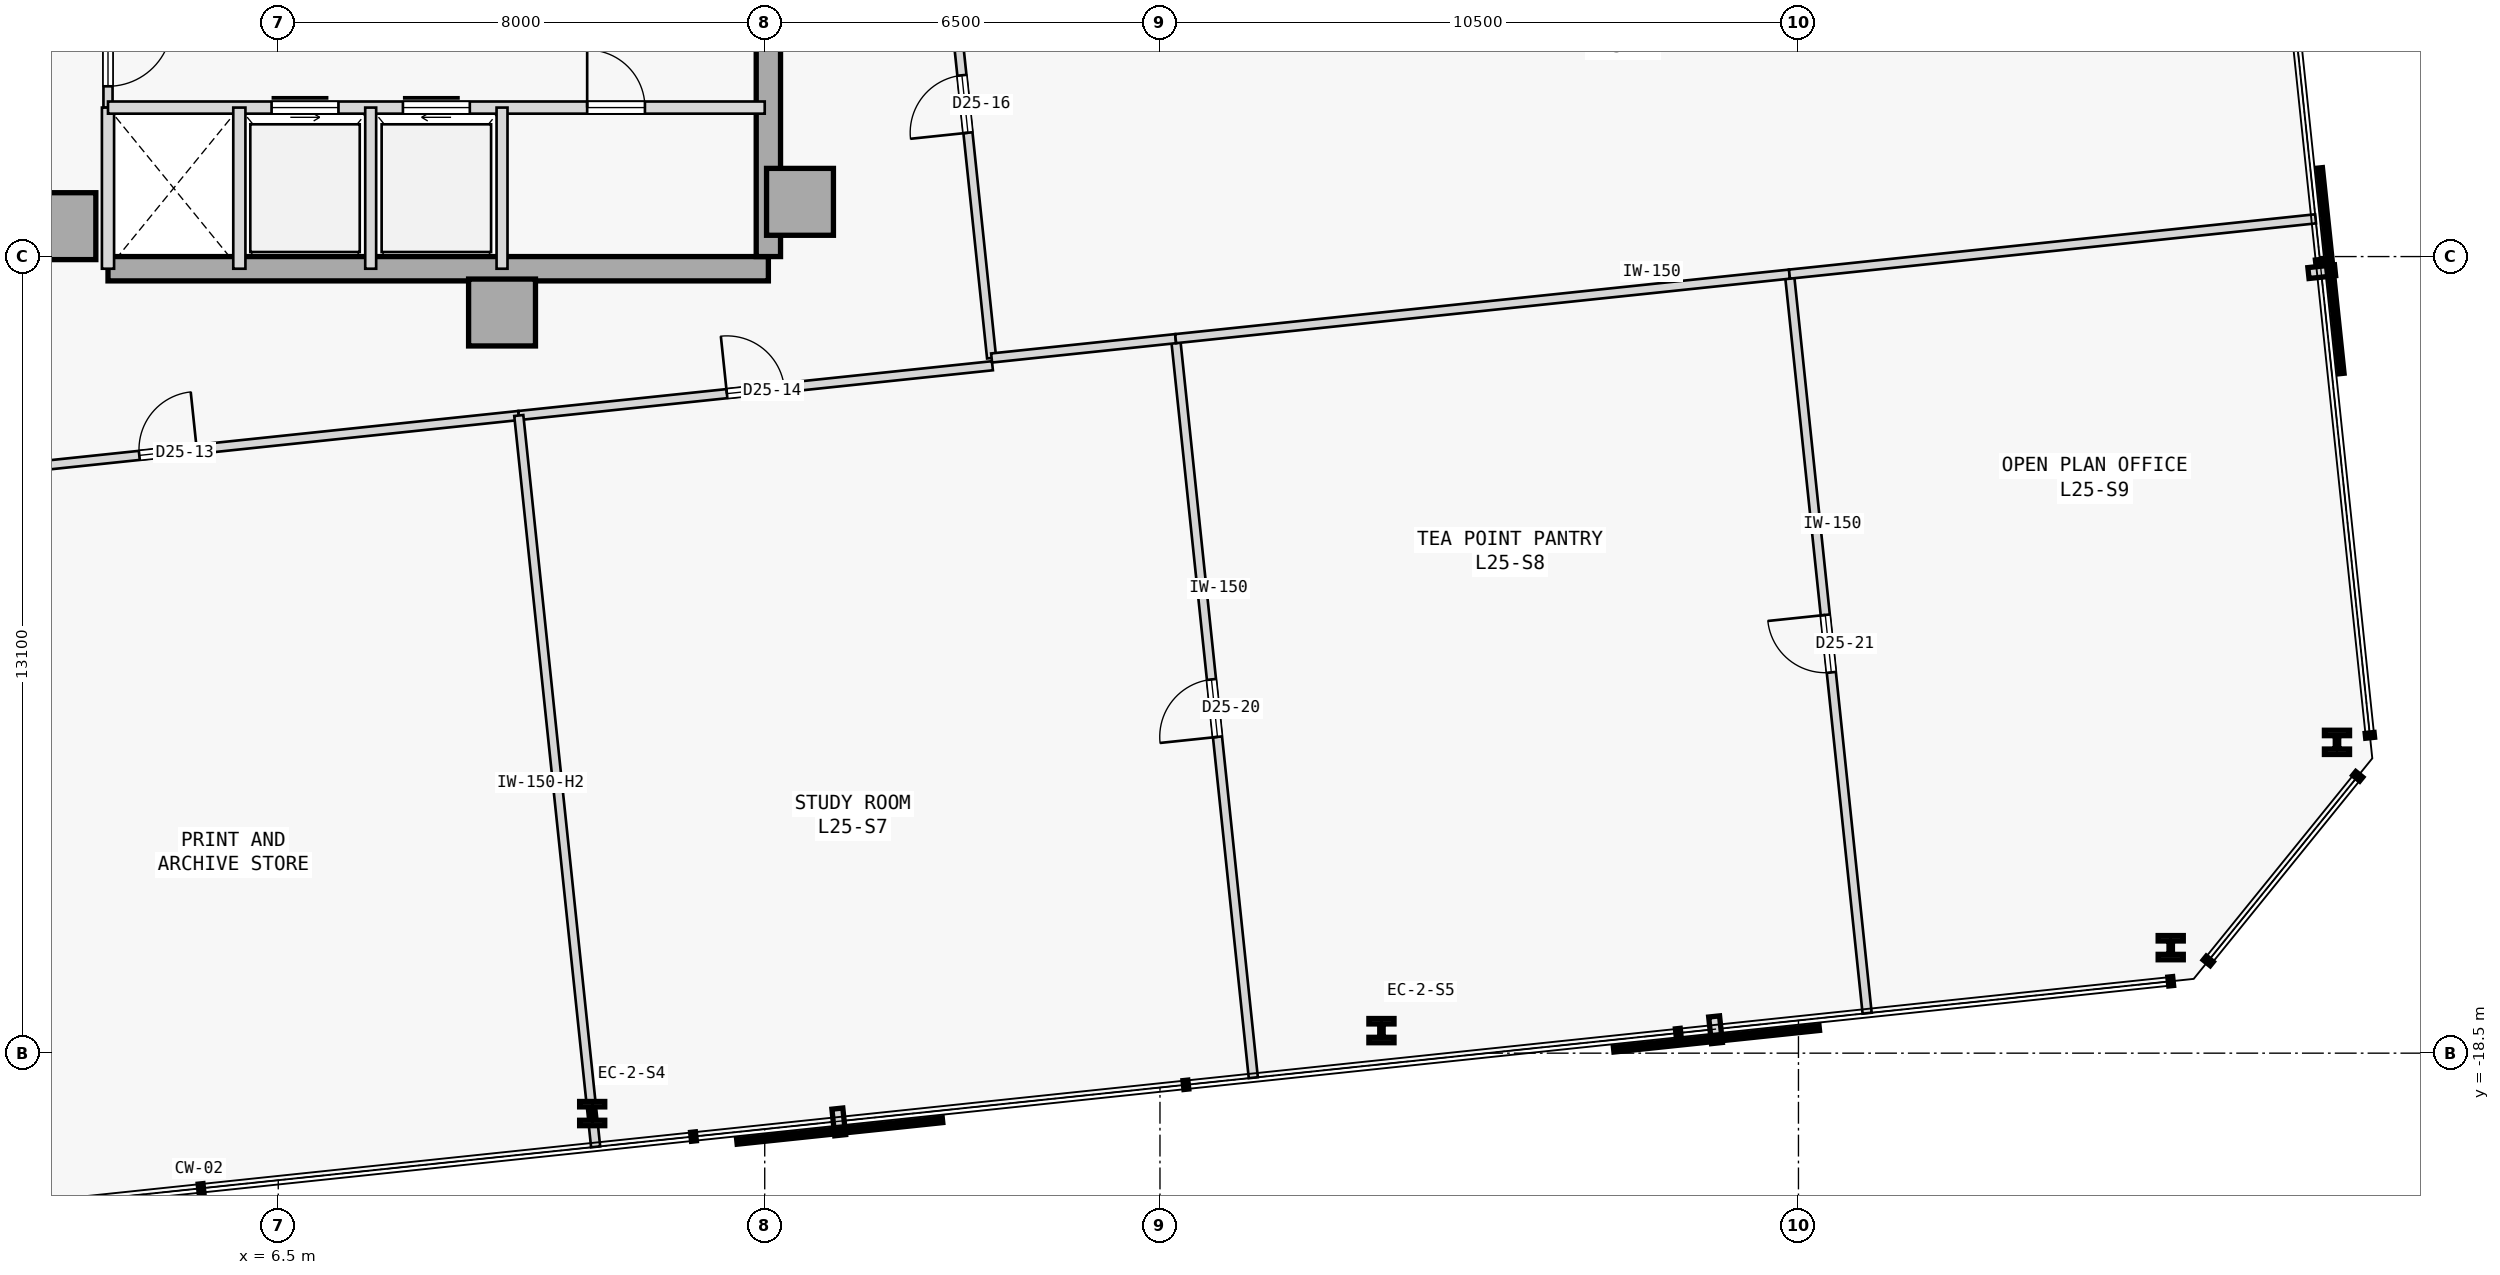
"""IFC4 building model, lengths in metres.
Left out: names, types, materials, properties, quantities, classifications, styles, units other than length and angle.
Written with IfcOpenShell. Run it as: python <this file> out.ifc"""

import sys

from ifc_helpers import new_model, si_unit, direction, frame, frame_2d, origin, origin_2d, place, context, subcontext, project, spatial, rectangle, i_section, extrude, element, fill, save


model = new_model("IFC4")
c1 = context("Model", 3, precision=1e-05, world=origin(), true_north=direction((0.0, 1.0)))
c2 = subcontext(c1, "Body", "Model", "MODEL_VIEW")
j1 = project(units=[si_unit("LENGTHUNIT", "METRE"), si_unit("PLANEANGLEUNIT", "RADIAN")], contexts=[c1])
p1 = place(None, origin())
s1 = spatial("IfcSite", under=j1, at=p1, CompositionType="ELEMENT")
p2 = place(p1, origin())
s2 = spatial("IfcBuilding", under=s1, at=p2, CompositionType="ELEMENT")
p3 = place(p2, frame((0.0, 0.0, 102.2)))
s3 = spatial("IfcBuildingStorey", under=s2, at=p3, CompositionType="ELEMENT", Elevation=102.2)
for number, where, z_axis, x_axis in (
    (1, (15.08, -4.5, 0.0), (0.0, 0.0, 1.0), (1.0, 0.0, 0.0)),
    (2, (10.18, -6.32, 0.0), (0.0, 0.0, 1.0), (1.0, 0.0, 0.0)),
    (3, (2.95, -4.9, 0.0), (0.0, 0.0, 1.0), (1.0, 0.0, 0.0)),
):
    element("IfcColumn", number, at=place(p3, frame(where, z_axis=z_axis, x_axis=x_axis)), inside=s3, PredefinedType="COLUMN", context=c2, shape_type="SweptSolid", body=[
        extrude(rectangle(XDim=1.1, YDim=1.1, at=origin_2d()), origin(), (0.0, 0.0, 1.0), 3.7),
    ])
p4 = place(p3, frame((3.7, -5.6, 0.0), z_axis=(0.0, 0.0, 1.0), x_axis=(1.0, 0.0, 0.0)))
e4 = element("IfcWall", 4, at=p4, inside=s3, PredefinedType="SHEAR", context=c2, shape_type="SweptSolid", body=[
    extrude(rectangle(XDim=10.86, YDim=0.4, at=frame_2d((5.43, 0.0))), origin(), (0.0, 0.0, 1.0), 3.475),
])
p5 = place(p3, frame((14.56, -5.4, 0.0), z_axis=(0.0, 0.0, 1.0), x_axis=(0.0, 1.0, 0.0)))
e5 = element("IfcWall", 5, at=p5, inside=s3, PredefinedType="SHEAR", context=c2, shape_type="SweptSolid", body=[
    extrude(rectangle(XDim=10.8, YDim=0.4, at=frame_2d((5.4, 0.0))), origin(), (0.0, 0.0, 1.0), 3.475),
])
for number, where, z_axis, x_axis in (
    (6, (11.663, -19.494, 0.0), (0.0, 0.0, 1.0), (1.0, 0.0, 0.0)),
    (7, (24.642, -18.129, 0.0), (0.0, 0.0, 1.0), (1.0, 0.0, 0.0)),
    (8, (37.622, -16.765, 0.0), (0.0, 0.0, 1.0), (1.0, 0.0, 0.0)),
    (9, (40.356, -13.389, 0.0), (0.0, 0.0, 1.0), (1.0, 0.0, 0.0)),
):
    element("IfcColumn", number, at=place(p3, frame(where, z_axis=z_axis, x_axis=x_axis)), inside=s3, PredefinedType="COLUMN", context=c2, shape_type="SweptSolid", body=[
        extrude(i_section(OverallWidth=0.413, OverallDepth=0.398, WebThickness=0.056, FlangeThickness=0.089, FilletRadius=0.015, at=origin_2d()), origin(), (0.0, 0.0, 1.0), 3.7),
    ])
p6 = place(p3, frame((3.7, -2.95, 0.0), z_axis=(0.0, 0.0, 1.0), x_axis=(0.0, 1.0, 0.0)))
e10 = element("IfcWall", 10, at=p6, inside=s3, PredefinedType="PARTITIONING", context=c2, shape_type="SweptSolid", body=[
    extrude(rectangle(XDim=1.8, YDim=0.15, at=frame_2d((0.9, 0.0))), origin(), (0.0, 0.0, 1.0), 3.475),
])
p7 = place(p6, frame((0.35, 0.0, 0.0)))
e11 = element("IfcOpeningElement", 11, at=p7, cuts=e10, PredefinedType="OPENING", context=c2, shape_type="SweptSolid", body=[
    extrude(rectangle(XDim=1.05, YDim=2.18, at=frame_2d((0.525, 1.09))), frame((0.0, 0.085, 0.0), z_axis=(0.0, -1.0, 0.0), x_axis=(1.0, 0.0, 0.0)), (0.0, 0.0, 1.0), 0.17),
])
p8 = place(p3, frame((3.7, -5.6, 0.0), z_axis=(0.0, 0.0, 1.0), x_axis=(0.0, 1.0, 0.0)))
e12 = element("IfcWall", 12, at=p8, inside=s3, PredefinedType="STANDARD", context=c2, shape_type="SweptSolid", body=[
    extrude(rectangle(XDim=2.65, YDim=0.2, at=frame_2d((1.325, 0.0))), origin(), (0.0, 0.0, 1.0), 3.475),
])
p9 = place(p3, frame((3.7, -2.95, 0.0), z_axis=(0.0, 0.0, 1.0), x_axis=(1.0, 0.0, 0.0)))
e13 = element("IfcWall", 13, at=p9, inside=s3, PredefinedType="STANDARD", context=c2, shape_type="SweptSolid", body=[
    extrude(rectangle(XDim=10.8, YDim=0.2, at=frame_2d((5.4, 0.0))), origin(), (0.0, 0.0, 1.0), 3.475),
])
p10 = place(p9, frame((2.69, 0.0, 0.0)))
e14 = element("IfcOpeningElement", 14, at=p10, cuts=e13, PredefinedType="OPENING", context=c2, shape_type="SweptSolid", body=[
    extrude(rectangle(XDim=1.1, YDim=2.15, at=frame_2d((0.55, 1.075))), frame((0.0, 0.11, 0.0), z_axis=(0.0, -1.0, 0.0), x_axis=(1.0, 0.0, 0.0)), (0.0, 0.0, 1.0), 0.22),
])
p11 = place(p9, frame((4.85, 0.0, 0.0)))
e15 = element("IfcOpeningElement", 15, at=p11, cuts=e13, PredefinedType="OPENING", context=c2, shape_type="SweptSolid", body=[
    extrude(rectangle(XDim=1.1, YDim=2.15, at=frame_2d((0.55, 1.075))), frame((0.0, 0.11, 0.0), z_axis=(0.0, -1.0, 0.0), x_axis=(1.0, 0.0, 0.0)), (0.0, 0.0, 1.0), 0.22),
])
p12 = place(p9, frame((7.88, 0.0, 0.0)))
e16 = element("IfcOpeningElement", 16, at=p12, cuts=e13, PredefinedType="OPENING", context=c2, shape_type="SweptSolid", body=[
    extrude(rectangle(XDim=0.95, YDim=2.15, at=frame_2d((0.475, 1.075))), frame((0.0, 0.11, 0.0), z_axis=(0.0, -1.0, 0.0), x_axis=(1.0, 0.0, 0.0)), (0.0, 0.0, 1.0), 0.22),
])
p13 = place(p3, frame((5.86, -5.6, 0.0), z_axis=(0.0, 0.0, 1.0), x_axis=(0.0, 1.0, 0.0)))
e17 = element("IfcWall", 17, at=p13, inside=s3, PredefinedType="STANDARD", context=c2, shape_type="SweptSolid", body=[
    extrude(rectangle(XDim=2.65, YDim=0.2, at=frame_2d((1.325, 0.0))), origin(), (0.0, 0.0, 1.0), 3.475),
])
for number, where, z_axis, x_axis in (
    (18, (10.18, -5.6, 0.0), (0.0, 0.0, 1.0), (0.0, 1.0, 0.0)),
    (19, (8.02, -5.6, 0.0), (0.0, 0.0, 1.0), (0.0, 1.0, 0.0)),
):
    element("IfcWall", number, at=place(p3, frame(where, z_axis=z_axis, x_axis=x_axis)), inside=s3, PredefinedType="STANDARD", context=c2, shape_type="SweptSolid", body=[
        extrude(rectangle(XDim=2.65, YDim=0.18, at=frame_2d((1.325, 0.0))), origin(), (0.0, 0.0, 1.0), 3.475),
    ])
p14 = place(p3, frame((-1.081, -9.226, 0.0), z_axis=(0.0, 0.0, 1.0), x_axis=(0.994523198252, 0.104516066418, 0.0)))
e20 = element("IfcWall", 20, at=p14, inside=s3, PredefinedType="PARTITIONING", context=c2, shape_type="SweptSolid", body=[
    extrude(rectangle(XDim=11.6, YDim=0.15, at=frame_2d((5.8, 0.0))), origin(), (0.0, 0.0, 1.0), 3.475),
])
p15 = place(p14, frame((5.325, 0.0, 0.0)))
e21 = element("IfcOpeningElement", 21, at=p15, cuts=e20, PredefinedType="OPENING", context=c2, shape_type="SweptSolid", body=[
    extrude(rectangle(XDim=0.95, YDim=2.15, at=frame_2d((0.475, 1.075))), frame((0.0, 0.085, 0.0), z_axis=(0.0, -1.0, 0.0), x_axis=(1.0, 0.0, 0.0)), (0.0, 0.0, 1.0), 0.17),
])
p16 = place(p3, frame((10.456, -8.014, 0.0), z_axis=(0.0, 0.0, 1.0), x_axis=(0.994522690965, 0.104520893393, 0.0)))
e22 = element("IfcWall", 22, at=p16, inside=s3, PredefinedType="PARTITIONING", context=c2, shape_type="SweptSolid", body=[
    extrude(rectangle(XDim=7.832, YDim=0.15, at=frame_2d((3.916, 0.0))), origin(), (0.0, 0.0, 1.0), 3.475),
])
p17 = place(p16, frame((3.441, 0.0, 0.0)))
e23 = element("IfcOpeningElement", 23, at=p17, cuts=e22, PredefinedType="OPENING", context=c2, shape_type="SweptSolid", body=[
    extrude(rectangle(XDim=0.95, YDim=2.15, at=frame_2d((0.475, 1.075))), frame((0.0, 0.085, 0.0), z_axis=(0.0, -1.0, 0.0), x_axis=(1.0, 0.0, 0.0)), (0.0, 0.0, 1.0), 0.17),
])
p18 = place(p3, frame((18.231, -7.068, 0.0), z_axis=(0.0, 0.0, 1.0), x_axis=(-0.104527419485, 0.994522005074, 0.0)))
e24 = element("IfcWall", 24, at=p18, inside=s3, PredefinedType="PARTITIONING", context=c2, shape_type="SweptSolid", body=[
    extrude(rectangle(XDim=8.399, YDim=0.15, at=frame_2d((4.199, 0.0))), origin(), (0.0, 0.0, 1.0), 3.475),
])
p19 = place(p18, frame((3.725, 0.0, 0.0)))
e25 = element("IfcOpeningElement", 25, at=p19, cuts=e24, PredefinedType="OPENING", context=c2, shape_type="SweptSolid", body=[
    extrude(rectangle(XDim=0.95, YDim=2.15, at=frame_2d((0.475, 1.075))), frame((0.0, 0.085, 0.0), z_axis=(0.0, -1.0, 0.0), x_axis=(1.0, 0.0, 0.0)), (0.0, 0.0, 1.0), 0.17),
])
p20 = place(p3, frame((11.719, -20.041, 0.0), z_axis=(0.0, 0.0, 1.0), x_axis=(-0.104517685722, 0.994523028075, 0.0)))
e26 = element("IfcWall", 26, at=p20, inside=s3, PredefinedType="PARTITIONING", context=c2, shape_type="SweptSolid", body=[
    extrude(rectangle(XDim=12.093, YDim=0.15, at=frame_2d((6.046, 0.0))), origin(), (0.0, 0.0, 1.0), 2.875),
])
p21 = place(p3, frame((22.535, -18.904, 0.0), z_axis=(0.0, 0.0, 1.0), x_axis=(-0.104520477826, 0.99452273464, 0.0)))
e27 = element("IfcWall", 27, at=p21, inside=s3, PredefinedType="PARTITIONING", context=c2, shape_type="SweptSolid", body=[
    extrude(rectangle(XDim=12.221, YDim=0.15, at=frame_2d((6.11, 0.0))), origin(), (0.0, 0.0, 1.0), 3.475),
])
p22 = place(p21, frame((5.635, 0.0, 0.0)))
e28 = element("IfcOpeningElement", 28, at=p22, cuts=e27, PredefinedType="OPENING", context=c2, shape_type="SweptSolid", body=[
    extrude(rectangle(XDim=0.95, YDim=2.15, at=frame_2d((0.475, 1.075))), frame((0.0, 0.085, 0.0), z_axis=(0.0, -1.0, 0.0), x_axis=(1.0, 0.0, 0.0)), (0.0, 0.0, 1.0), 0.17),
])
p23 = place(p3, frame((18.231, -7.068, 0.0), z_axis=(0.0, 0.0, 1.0), x_axis=(0.994520828596, 0.104538612428, 0.0)))
e29 = element("IfcWall", 29, at=p23, inside=s3, PredefinedType="PARTITIONING", context=c2, shape_type="SweptSolid", body=[
    extrude(rectangle(XDim=3.043, YDim=0.15, at=frame_2d((1.521, 0.0))), origin(), (0.0, 0.0, 1.0), 3.475),
])
p24 = place(p3, frame((32.629, -17.843, 0.0), z_axis=(0.0, 0.0, 1.0), x_axis=(-0.104538159751, 0.994520876179, 0.0)))
e30 = element("IfcWall", 30, at=p24, inside=s3, PredefinedType="PARTITIONING", context=c2, shape_type="SweptSolid", body=[
    extrude(rectangle(XDim=12.221, YDim=0.15, at=frame_2d((6.111, 0.0))), origin(), (0.0, 0.0, 1.0), 3.475),
])
p25 = place(p24, frame((5.635, 0.0, 0.0)))
e31 = element("IfcOpeningElement", 31, at=p25, cuts=e30, PredefinedType="OPENING", context=c2, shape_type="SweptSolid", body=[
    extrude(rectangle(XDim=0.95, YDim=2.15, at=frame_2d((0.475, 1.075))), frame((0.0, 0.085, 0.0), z_axis=(0.0, -1.0, 0.0), x_axis=(1.0, 0.0, 0.0)), (0.0, 0.0, 1.0), 0.17),
])
p26 = place(p3, frame((21.258, -6.75, 0.0), z_axis=(0.0, 0.0, 1.0), x_axis=(0.994520994424, 0.104537034822, 0.0)))
e32 = element("IfcWall", 32, at=p26, inside=s3, PredefinedType="PARTITIONING", context=c2, shape_type="SweptSolid", body=[
    extrude(rectangle(XDim=10.15, YDim=0.15, at=frame_2d((5.075, 0.0))), origin(), (0.0, 0.0, 1.0), 3.475),
])
p27 = place(p3, frame((31.352, -5.689, 0.0), z_axis=(0.0, 0.0, 1.0), x_axis=(0.994521893041, 0.104528485415, 0.0)))
e33 = element("IfcWall", 33, at=p27, inside=s3, PredefinedType="PARTITIONING", context=c2, shape_type="SweptSolid", body=[
    extrude(rectangle(XDim=8.7, YDim=0.15, at=frame_2d((4.35, 0.0))), origin(), (0.0, 0.0, 1.0), 3.475),
])
p28 = place(p7, frame((1.05, 0.0, 0.0), z_axis=(0.0, 0.0, 1.0), x_axis=(-1.0, 0.0, 0.0)))
e34 = element("IfcDoor", 34, at=p28, inside=s3, OperationType="SINGLE_SWING_RIGHT", PredefinedType="DOOR", context=c2, shape_type="SweptSolid", body=[
    extrude(rectangle(XDim=1.05, YDim=2.18, at=frame_2d((0.525, 1.09))), frame((0.0, 0.025, 0.0), z_axis=(0.0, -1.0, 0.0), x_axis=(1.0, 0.0, 0.0)), (0.0, 0.0, 1.0), 0.05),
])
fill(e11, e34)
p29 = place(p10, origin())
e35 = element("IfcDoor", 35, at=p29, inside=s3, OperationType="SLIDING_TO_LEFT", PredefinedType="DOOR", context=c2, shape_type="SweptSolid", body=[
    extrude(rectangle(XDim=1.1, YDim=2.15, at=frame_2d((0.55, 1.075))), frame((0.0, 0.025, 0.0), z_axis=(0.0, -1.0, 0.0), x_axis=(1.0, 0.0, 0.0)), (0.0, 0.0, 1.0), 0.05),
])
fill(e14, e35)
p30 = place(p11, origin())
e36 = element("IfcDoor", 36, at=p30, inside=s3, OperationType="SLIDING_TO_RIGHT", PredefinedType="DOOR", context=c2, shape_type="SweptSolid", body=[
    extrude(rectangle(XDim=1.1, YDim=2.15, at=frame_2d((0.55, 1.075))), frame((0.0, 0.025, 0.0), z_axis=(0.0, -1.0, 0.0), x_axis=(1.0, 0.0, 0.0)), (0.0, 0.0, 1.0), 0.05),
])
fill(e15, e36)
p31 = place(p12, origin())
e37 = element("IfcDoor", 37, at=p31, inside=s3, OperationType="SINGLE_SWING_LEFT", PredefinedType="DOOR", context=c2, shape_type="SweptSolid", body=[
    extrude(rectangle(XDim=0.95, YDim=2.15, at=frame_2d((0.475, 1.075))), frame((0.0, 0.025, 0.0), z_axis=(0.0, -1.0, 0.0), x_axis=(1.0, 0.0, 0.0)), (0.0, 0.0, 1.0), 0.05),
])
fill(e16, e37)
p32 = place(p15, origin())
e38 = element("IfcDoor", 38, at=p32, inside=s3, OperationType="SINGLE_SWING_RIGHT", PredefinedType="DOOR", context=c2, shape_type="SweptSolid", body=[
    extrude(rectangle(XDim=0.95, YDim=2.15, at=frame_2d((0.475, 1.075))), frame((0.0, 0.025, 0.0), z_axis=(0.0, -1.0, 0.0), x_axis=(1.0, 0.0, 0.0)), (0.0, 0.0, 1.0), 0.05),
])
fill(e21, e38)
p33 = place(p17, origin())
e39 = element("IfcDoor", 39, at=p33, inside=s3, OperationType="SINGLE_SWING_LEFT", PredefinedType="DOOR", context=c2, shape_type="SweptSolid", body=[
    extrude(rectangle(XDim=0.95, YDim=2.15, at=frame_2d((0.475, 1.075))), frame((0.0, 0.025, 0.0), z_axis=(0.0, -1.0, 0.0), x_axis=(1.0, 0.0, 0.0)), (0.0, 0.0, 1.0), 0.05),
])
fill(e23, e39)
p34 = place(p19, origin())
e40 = element("IfcDoor", 40, at=p34, inside=s3, OperationType="SINGLE_SWING_LEFT", PredefinedType="DOOR", context=c2, shape_type="SweptSolid", body=[
    extrude(rectangle(XDim=0.95, YDim=2.15, at=frame_2d((0.475, 1.075))), frame((0.0, 0.025, 0.0), z_axis=(0.0, -1.0, 0.0), x_axis=(1.0, 0.0, 0.0)), (0.0, 0.0, 1.0), 0.05),
])
fill(e25, e40)
p35 = place(p22, origin())
e41 = element("IfcDoor", 41, at=p35, inside=s3, OperationType="SINGLE_SWING_LEFT", PredefinedType="DOOR", context=c2, shape_type="SweptSolid", body=[
    extrude(rectangle(XDim=0.95, YDim=2.15, at=frame_2d((0.475, 1.075))), frame((0.0, 0.025, 0.0), z_axis=(0.0, -1.0, 0.0), x_axis=(1.0, 0.0, 0.0)), (0.0, 0.0, 1.0), 0.05),
])
fill(e28, e41)
p36 = place(p25, origin())
e42 = element("IfcDoor", 42, at=p36, inside=s3, OperationType="SINGLE_SWING_RIGHT", PredefinedType="DOOR", context=c2, shape_type="SweptSolid", body=[
    extrude(rectangle(XDim=0.95, YDim=2.15, at=frame_2d((0.475, 1.075))), frame((0.0, 0.025, 0.0), z_axis=(0.0, -1.0, 0.0), x_axis=(1.0, 0.0, 0.0)), (0.0, 0.0, 1.0), 0.05),
])
fill(e31, e42)
save(model, sys.argv[1])
